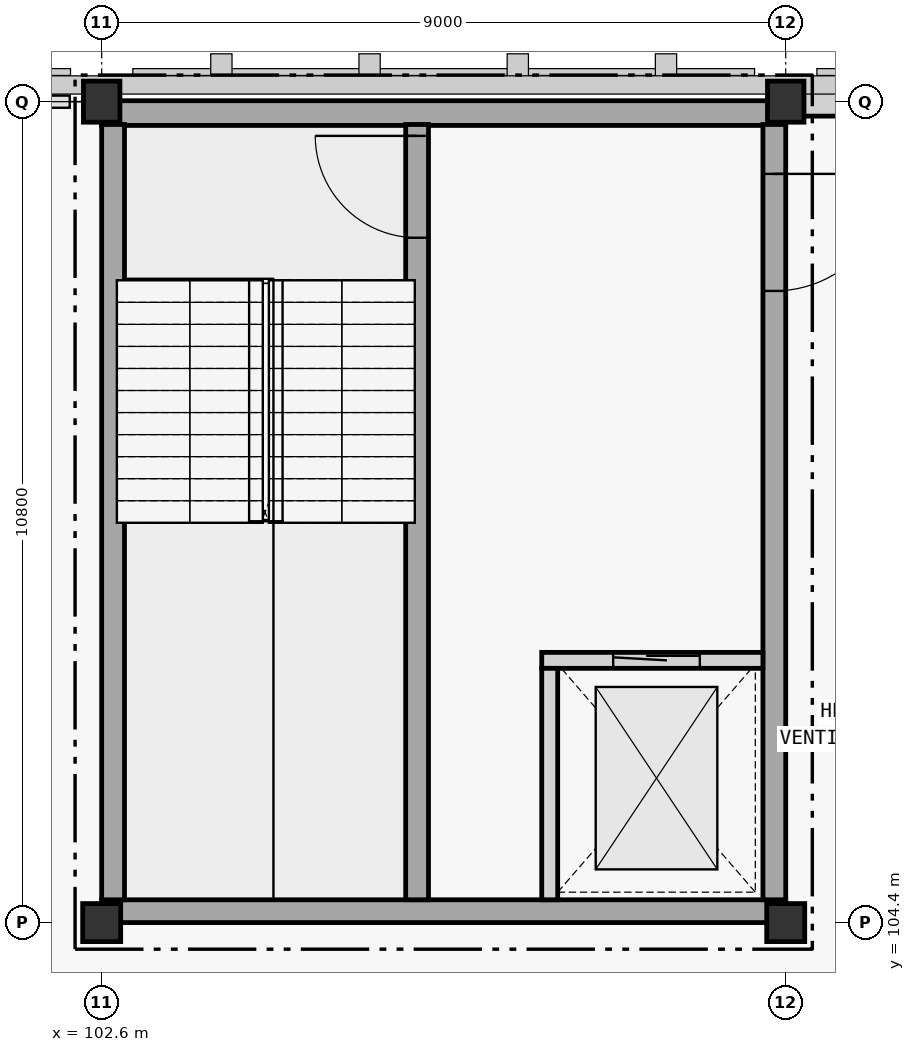
"""IFC4 building model, lengths in metres.
Left out: names, types, materials, properties, quantities, classifications, styles, units other than length and angle.
Written with IfcOpenShell. Run it as: python <this file> out.ifc"""

import sys

from ifc_helpers import new_model, si_unit, direction, frame, frame_2d, origin, origin_2d, place, context, subcontext, project, spatial, rectangle, extrude, element, fill, save


model = new_model("IFC4")
c1 = context("Model", 3, precision=1e-05, world=origin(), true_north=direction((0.0, 1.0)))
c2 = subcontext(c1, "Body", "Model", "MODEL_VIEW")
j1 = project(units=[si_unit("LENGTHUNIT", "METRE"), si_unit("PLANEANGLEUNIT", "RADIAN")], contexts=[c1])
p1 = place(None, origin())
s1 = spatial("IfcSite", under=j1, at=p1, CompositionType="ELEMENT")
p2 = place(p1, origin())
s2 = spatial("IfcBuilding", under=s1, at=p2, CompositionType="ELEMENT")
p3 = place(p2, frame((0.0, 0.0, 15.0)))
s3 = spatial("IfcBuildingStorey", under=s2, at=p3, CompositionType="ELEMENT", Elevation=15.0)
p4 = place(p3, frame((102.6, 104.4, 0.0), z_axis=(0.0, 0.0, 1.0), x_axis=(1.0, 0.0, 0.0)))
e1 = element("IfcColumn", 1, at=p4, inside=s3, PredefinedType="COLUMN", context=c2, shape_type="SweptSolid", body=[
    extrude(rectangle(XDim=0.5, YDim=0.5, at=origin_2d()), origin(), (0.0, 0.0, 1.0), 4.2),
])
p5 = place(p3, frame((102.6, 115.2, 0.0), z_axis=(0.0, 0.0, 1.0), x_axis=(1.0, 0.0, 0.0)))
e2 = element("IfcColumn", 2, at=p5, inside=s3, PredefinedType="COLUMN", context=c2, shape_type="SweptSolid", body=[
    extrude(rectangle(XDim=0.48, YDim=0.54, at=origin_2d()), origin(), (0.0, 0.0, 1.0), 4.2),
])
p6 = place(p3, frame((111.6, 104.4, 0.0), z_axis=(0.0, 0.0, 1.0), x_axis=(1.0, 0.0, 0.0)))
e3 = element("IfcColumn", 3, at=p6, inside=s3, PredefinedType="COLUMN", context=c2, shape_type="SweptSolid", body=[
    extrude(rectangle(XDim=0.5, YDim=0.5, at=origin_2d()), origin(), (0.0, 0.0, 1.0), 4.2),
])
p7 = place(p3, frame((111.6, 115.2, 0.0), z_axis=(0.0, 0.0, 1.0), x_axis=(1.0, 0.0, 0.0)))
e4 = element("IfcColumn", 4, at=p7, inside=s3, PredefinedType="COLUMN", context=c2, shape_type="SweptSolid", body=[
    extrude(rectangle(XDim=0.48, YDim=0.54, at=origin_2d()), origin(), (0.0, 0.0, 1.0), 4.2),
])
p8 = place(p3, frame((111.6, 104.55, 0.0), z_axis=(0.0, 0.0, 1.0), x_axis=(-1.0, 0.0, 0.0)))
e5 = element("IfcWall", 5, at=p8, inside=s3, PredefinedType="SHEAR", context=c2, shape_type="SweptSolid", body=[
    extrude(rectangle(XDim=9.0, YDim=0.3, at=frame_2d((4.5, 0.0))), origin(), (0.0, 0.0, 1.0), 4.2),
])
p9 = place(p3, frame((102.6, 115.05, 0.0), z_axis=(0.0, 0.0, 1.0), x_axis=(1.0, 0.0, 0.0)))
e6 = element("IfcWall", 6, at=p9, inside=s3, PredefinedType="SHEAR", context=c2, shape_type="SweptSolid", body=[
    extrude(rectangle(XDim=9.0, YDim=0.325, at=frame_2d((4.5, 0.0))), origin(), (0.0, 0.0, 1.0), 4.2),
])
p10 = place(p3, frame((102.75, 104.7, 0.0), z_axis=(0.0, 0.0, 1.0), x_axis=(0.0, 1.0, 0.0)))
e7 = element("IfcWall", 7, at=p10, inside=s3, PredefinedType="SHEAR", context=c2, shape_type="SweptSolid", body=[
    extrude(rectangle(XDim=10.2, YDim=0.3, at=frame_2d((5.1, 0.0))), origin(), (0.0, 0.0, 1.0), 4.2),
])
p11 = place(p3, frame((111.45, 114.9, 0.0), z_axis=(0.0, 0.0, 1.0), x_axis=(0.0, -1.0, 0.0)))
e8 = element("IfcWall", 8, at=p11, inside=s3, PredefinedType="SHEAR", context=c2, shape_type="SweptSolid", body=[
    extrude(rectangle(XDim=10.2, YDim=0.3, at=frame_2d((5.1, 0.0))), origin(), (0.0, 0.0, 1.0), 4.2),
])
p12 = place(p11, frame((0.65, 0.0, 0.0)))
e9 = element("IfcOpeningElement", 9, at=p12, cuts=e8, PredefinedType="OPENING", context=c2, shape_type="SweptSolid", body=[
    extrude(rectangle(XDim=1.54, YDim=2.22, at=frame_2d((0.77, 1.11))), frame((0.0, 0.15, 0.0), z_axis=(0.0, -1.0, 0.0), x_axis=(1.0, 0.0, 0.0)), (0.0, 0.0, 1.0), 0.3),
])
p13 = place(p3, frame((106.75, 104.7, 0.0), z_axis=(0.0, 0.0, 1.0), x_axis=(0.0, 1.0, 0.0)))
e10 = element("IfcWall", 10, at=p13, inside=s3, PredefinedType="SHEAR", context=c2, shape_type="SweptSolid", body=[
    extrude(rectangle(XDim=10.2, YDim=0.3, at=frame_2d((5.1, 0.0))), origin(), (0.0, 0.0, 1.0), 4.2),
])
p14 = place(p13, frame((8.71, 0.0, 0.0)))
e11 = element("IfcOpeningElement", 11, at=p14, cuts=e10, PredefinedType="OPENING", context=c2, shape_type="SweptSolid", body=[
    extrude(rectangle(XDim=1.34, YDim=2.18, at=frame_2d((0.67, 1.09))), frame((0.0, 0.15, 0.0), z_axis=(0.0, -1.0, 0.0), x_axis=(1.0, 0.0, 0.0)), (0.0, 0.0, 1.0), 0.3),
])
p15 = place(p3, frame((111.836, 115.2, 0.0), z_axis=(0.0, 0.0, 1.0), x_axis=(1.0, 0.0, 0.0)))
e12 = element("IfcWall", 12, at=p15, inside=s3, PredefinedType="STANDARD", context=c2, shape_type="SweptSolid", body=[
    extrude(rectangle(XDim=6.728, YDim=0.38, at=frame_2d((3.364, 0.0))), origin(), (0.0, 0.0, 1.0), 3.26),
])
p16 = place(p3, frame((108.39, 107.85, 0.0), z_axis=(0.0, 0.0, 1.0), x_axis=(1.0, 0.0, 0.0)))
e13 = element("IfcWall", 13, at=p16, inside=s3, PredefinedType="STANDARD", context=c2, shape_type="SweptSolid", body=[
    extrude(rectangle(XDim=2.91, YDim=0.21, at=frame_2d((1.455, 0.0))), origin(), (0.0, 0.0, 1.0), 4.2),
])
p17 = place(p16, frame((0.94, 0.0, 0.0)))
e14 = element("IfcOpeningElement", 14, at=p17, cuts=e13, PredefinedType="OPENING", context=c2, shape_type="SweptSolid", body=[
    extrude(rectangle(XDim=1.14, YDim=2.16, at=frame_2d((0.57, 1.08))), frame((0.0, 0.105, 0.0), z_axis=(0.0, -1.0, 0.0), x_axis=(1.0, 0.0, 0.0)), (0.0, 0.0, 1.0), 0.21),
])
p18 = place(p3, frame((108.495, 104.7, 0.0), z_axis=(0.0, 0.0, 1.0), x_axis=(0.0, 1.0, 0.0)))
e15 = element("IfcWall", 15, at=p18, inside=s3, PredefinedType="STANDARD", context=c2, shape_type="SweptSolid", body=[
    extrude(rectangle(XDim=3.045, YDim=0.21, at=frame_2d((1.522, 0.0))), origin(), (0.0, 0.0, 1.0), 4.2),
])
p19 = place(p17, origin())
e16 = element("IfcDoor", 16, at=p19, inside=s3, OperationType="SLIDING_TO_LEFT", PredefinedType="DOOR", context=c2, shape_type="SweptSolid", body=[
    extrude(rectangle(XDim=1.14, YDim=2.16, at=frame_2d((0.57, 1.08))), frame((0.0, 0.025, 0.0), z_axis=(0.0, -1.0, 0.0), x_axis=(1.0, 0.0, 0.0)), (0.0, 0.0, 1.0), 0.05),
])
fill(e14, e16)
p20 = place(p14, origin())
e17 = element("IfcDoor", 17, at=p20, inside=s3, OperationType="SINGLE_SWING_RIGHT", PredefinedType="DOOR", context=c2, shape_type="SweptSolid", body=[
    extrude(rectangle(XDim=1.34, YDim=2.18, at=frame_2d((0.67, 1.09))), frame((0.0, 0.025, 0.0), z_axis=(0.0, -1.0, 0.0), x_axis=(1.0, 0.0, 0.0)), (0.0, 0.0, 1.0), 0.05),
])
fill(e11, e17)
p21 = place(p12, origin())
e18 = element("IfcDoor", 18, at=p21, inside=s3, OperationType="SINGLE_SWING_LEFT", PredefinedType="DOOR", context=c2, shape_type="SweptSolid", body=[
    extrude(rectangle(XDim=1.54, YDim=2.22, at=frame_2d((0.77, 1.11))), frame((0.0, 0.025, 0.0), z_axis=(0.0, -1.0, 0.0), x_axis=(1.0, 0.0, 0.0)), (0.0, 0.0, 1.0), 0.05),
])
fill(e9, e18)
save(model, sys.argv[1])
